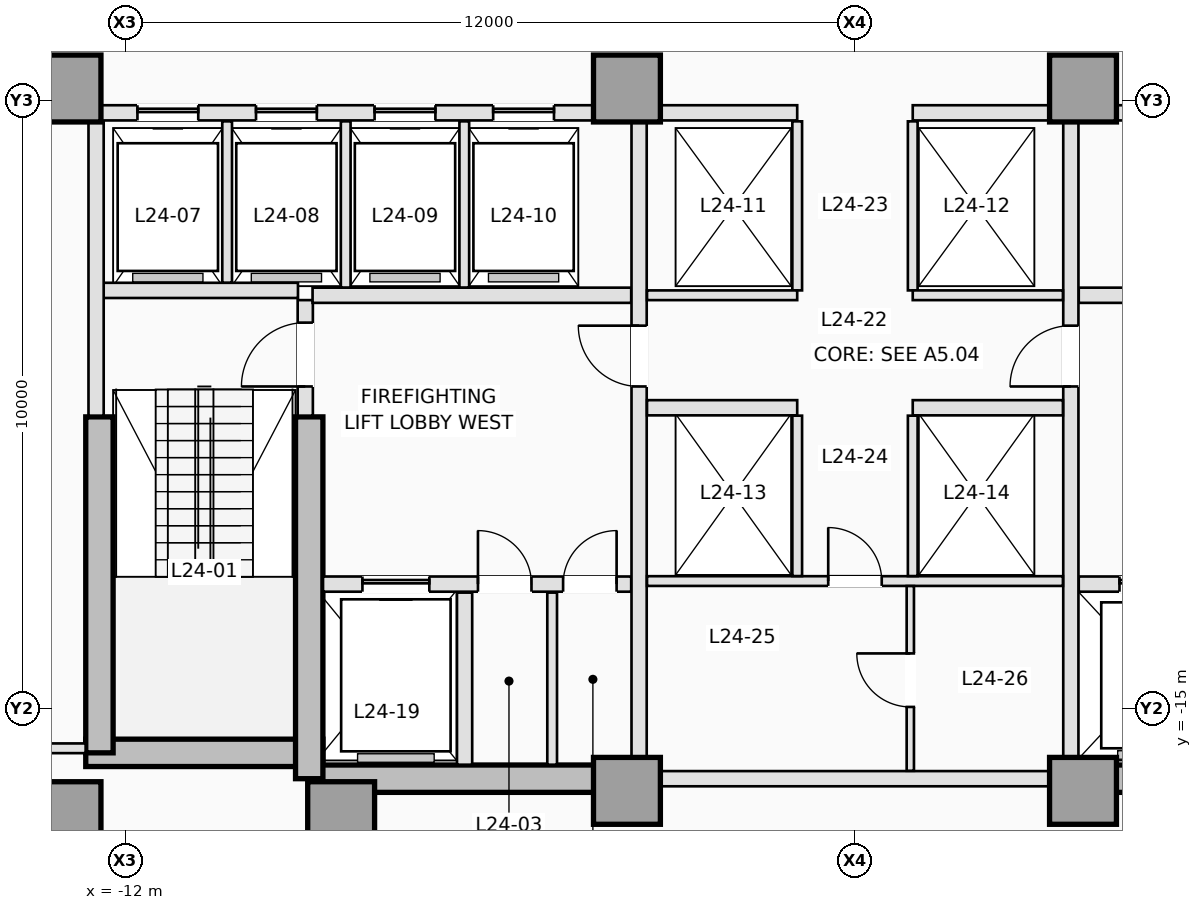
"""IFC4 building model, lengths in metres.
Left out: names, types, materials, properties, quantities, classifications, styles, units other than length and angle.
Written with IfcOpenShell. Run it as: python <this file> out.ifc"""

import sys

from ifc_helpers import new_model, si_unit, direction, frame, frame_2d, origin, origin_2d, place, context, subcontext, project, spatial, rectangle, extrude, element, fill, save


model = new_model("IFC4")
c1 = context("Model", 3, precision=1e-05, world=origin(), true_north=direction((0.0, 1.0)))
c2 = subcontext(c1, "Body", "Model", "MODEL_VIEW")
j1 = project(units=[si_unit("LENGTHUNIT", "METRE"), si_unit("PLANEANGLEUNIT", "RADIAN")], contexts=[c1])
p1 = place(None, origin())
s1 = spatial("IfcSite", under=j1, at=p1, CompositionType="ELEMENT")
p2 = place(p1, origin())
s2 = spatial("IfcBuilding", under=s1, at=p2, CompositionType="ELEMENT")
p3 = place(p2, frame((0.0, 0.0, 90.6)))
s3 = spatial("IfcBuildingStorey", under=s2, at=p3, CompositionType="ELEMENT", Elevation=90.6)
p4 = place(p3, frame((-12.65, -15.725, 0.0), z_axis=(0.0, 0.0, 1.0), x_axis=(1.0, 0.0, 0.0)))
e1 = element("IfcWall", 1, at=p4, inside=s3, PredefinedType="SHEAR", context=c2, shape_type="SweptSolid", body=[
    extrude(rectangle(XDim=3.9, YDim=0.45, at=frame_2d((1.95, 0.0))), origin(), (0.0, 0.0, 1.0), 4.4),
])
for number, where, z_axis, x_axis in (
    (2, (-8.975, -16.15, 0.0), (0.0, 0.0, 1.0), (1.0, 0.0, 0.0)),
    (3, (3.75, -16.15, 0.0), (0.0, 0.0, 1.0), (1.0, 0.0, 0.0)),
):
    element("IfcWall", number, at=place(p3, frame(where, z_axis=z_axis, x_axis=x_axis)), inside=s3, PredefinedType="SHEAR", context=c2, shape_type="SweptSolid", body=[
        extrude(rectangle(XDim=5.225, YDim=0.45, at=frame_2d((2.613, 0.0))), origin(), (0.0, 0.0, 1.0), 4.4),
    ])
p5 = place(p3, frame((-12.425, -15.725, 0.0), z_axis=(0.0, 0.0, 1.0), x_axis=(0.0, 1.0, 0.0)))
e4 = element("IfcWall", 4, at=p5, inside=s3, PredefinedType="SHEAR", context=c2, shape_type="SweptSolid", body=[
    extrude(rectangle(XDim=5.525, YDim=0.45, at=frame_2d((2.763, 0.0))), origin(), (0.0, 0.0, 1.0), 4.4),
])
p6 = place(p3, frame((-8.975, -16.15, 0.0), z_axis=(0.0, 0.0, 1.0), x_axis=(0.0, 1.0, 0.0)))
e5 = element("IfcWall", 5, at=p6, inside=s3, PredefinedType="SHEAR", context=c2, shape_type="SweptSolid", body=[
    extrude(rectangle(XDim=5.95, YDim=0.45, at=frame_2d((2.975, 0.0))), origin(), (0.0, 0.0, 1.0), 4.4),
])
for number, where, z_axis, x_axis in (
    (6, (-12.95, -16.75, 0.0), (0.0, 0.0, 1.0), (1.0, 0.0, 0.0)),
    (7, (-8.45, -16.75, 0.0), (0.0, 0.0, 1.0), (1.0, 0.0, 0.0)),
    (8, (-3.75, -16.35, 0.0), (0.0, 0.0, 1.0), (1.0, 0.0, 0.0)),
    (9, (3.75, -16.35, 0.0), (0.0, 0.0, 1.0), (1.0, 0.0, 0.0)),
    (10, (-12.95, -4.8, 0.0), (0.0, 0.0, 1.0), (1.0, 0.0, 0.0)),
    (11, (-3.75, -4.8, 0.0), (0.0, 0.0, 1.0), (1.0, 0.0, 0.0)),
    (12, (3.75, -4.8, 0.0), (0.0, 0.0, 1.0), (1.0, 0.0, 0.0)),
):
    element("IfcColumn", number, at=place(p3, frame(where, z_axis=z_axis, x_axis=x_axis)), inside=s3, PredefinedType="COLUMN", context=c2, shape_type="SweptSolid", body=[
        extrude(rectangle(XDim=1.1, YDim=1.1, at=origin_2d()), origin(), (0.0, 0.0, 1.0), 4.4),
    ])
p7 = place(p3, frame((-9.04, -10.18, 0.0), z_axis=(0.0, 0.0, 1.0), x_axis=(0.0, 1.0, 0.0)))
e13 = element("IfcWall", 13, at=p7, inside=s3, PredefinedType="PARTITIONING", context=c2, shape_type="SweptSolid", body=[
    extrude(rectangle(XDim=1.9, YDim=0.25, at=frame_2d((0.95, 0.0))), origin(), (0.0, 0.0, 1.0), 4.15),
])
p8 = place(p7, frame((0.48, 0.0, 0.0)))
e14 = element("IfcOpeningElement", 14, at=p8, cuts=e13, PredefinedType="OPENING", context=c2, shape_type="SweptSolid", body=[
    extrude(rectangle(XDim=1.05, YDim=2.15, at=frame_2d((0.525, 1.075))), frame((0.0, 0.135, 0.0), z_axis=(0.0, -1.0, 0.0), x_axis=(1.0, 0.0, 0.0)), (0.0, 0.0, 1.0), 0.27),
])
p9 = place(p3, frame((-12.38, -8.12, 0.0), z_axis=(0.0, 0.0, 1.0), x_axis=(1.0, 0.0, 0.0)))
e15 = element("IfcWall", 15, at=p9, inside=s3, PredefinedType="PARTITIONING", context=c2, shape_type="SweptSolid", body=[
    extrude(rectangle(XDim=3.22, YDim=0.25, at=frame_2d((1.61, 0.0))), origin(), (0.0, 0.0, 1.0), 4.15),
])
p10 = place(p3, frame((-12.48, -10.18, 0.0), z_axis=(0.0, 0.0, 1.0), x_axis=(0.0, 1.0, 0.0)))
e16 = element("IfcWall", 16, at=p10, inside=s3, PredefinedType="PARTITIONING", context=c2, shape_type="SweptSolid", body=[
    extrude(rectangle(XDim=4.828, YDim=0.25, at=frame_2d((2.414, 0.0))), origin(), (0.0, 0.0, 1.0), 4.15),
])
p11 = place(p3, frame((-8.748, -12.95, 0.0), z_axis=(0.0, 0.0, 1.0), x_axis=(1.0, 0.0, 0.0)))
e17 = element("IfcWall", 17, at=p11, inside=s3, PredefinedType="PARTITIONING", context=c2, shape_type="SweptSolid", body=[
    extrude(rectangle(XDim=5.068, YDim=0.25, at=frame_2d((2.534, 0.0))), origin(), (0.0, 0.0, 1.0), 4.15),
])
p12 = place(p11, frame((0.648, 0.0, 0.0)))
e18 = element("IfcOpeningElement", 18, at=p12, cuts=e17, PredefinedType="OPENING", context=c2, shape_type="SweptSolid", body=[
    extrude(rectangle(XDim=1.1, YDim=2.15, at=frame_2d((0.55, 1.075))), frame((0.0, 0.135, 0.0), z_axis=(0.0, -1.0, 0.0), x_axis=(1.0, 0.0, 0.0)), (0.0, 0.0, 1.0), 0.27),
])
p13 = place(p11, frame((2.548, 0.0, 0.0)))
e19 = element("IfcOpeningElement", 19, at=p13, cuts=e17, PredefinedType="OPENING", context=c2, shape_type="SweptSolid", body=[
    extrude(rectangle(XDim=0.88, YDim=2.1, at=frame_2d((0.44, 1.05))), frame((0.0, 0.135, 0.0), z_axis=(0.0, -1.0, 0.0), x_axis=(1.0, 0.0, 0.0)), (0.0, 0.0, 1.0), 0.27),
])
p14 = place(p11, frame((3.948, 0.0, 0.0)))
e20 = element("IfcOpeningElement", 20, at=p14, cuts=e17, PredefinedType="OPENING", context=c2, shape_type="SweptSolid", body=[
    extrude(rectangle(XDim=0.88, YDim=2.1, at=frame_2d((0.44, 1.05))), frame((0.0, 0.135, 0.0), z_axis=(0.0, -1.0, 0.0), x_axis=(1.0, 0.0, 0.0)), (0.0, 0.0, 1.0), 0.27),
])
p15 = place(p3, frame((3.68, -12.95, 0.0), z_axis=(0.0, 0.0, 1.0), x_axis=(1.0, 0.0, 0.0)))
e21 = element("IfcWall", 21, at=p15, inside=s3, PredefinedType="PARTITIONING", context=c2, shape_type="SweptSolid", body=[
    extrude(rectangle(XDim=5.068, YDim=0.25, at=frame_2d((2.534, 0.0))), origin(), (0.0, 0.0, 1.0), 4.15),
])
p16 = place(p15, frame((3.32, 0.0, 0.0)))
e22 = element("IfcOpeningElement", 22, at=p16, cuts=e21, PredefinedType="OPENING", context=c2, shape_type="SweptSolid", body=[
    extrude(rectangle(XDim=1.1, YDim=2.15, at=frame_2d((0.55, 1.075))), frame((0.0, 0.135, 0.0), z_axis=(0.0, -1.0, 0.0), x_axis=(1.0, 0.0, 0.0)), (0.0, 0.0, 1.0), 0.27),
])
p17 = place(p15, frame((0.67, 0.0, 0.0)))
e23 = element("IfcOpeningElement", 23, at=p17, cuts=e21, PredefinedType="OPENING", context=c2, shape_type="SweptSolid", body=[
    extrude(rectangle(XDim=1.2, YDim=2.15, at=frame_2d((0.6, 1.075))), frame((0.0, 0.135, 0.0), z_axis=(0.0, -1.0, 0.0), x_axis=(1.0, 0.0, 0.0)), (0.0, 0.0, 1.0), 0.27),
])
p18 = place(p3, frame((-6.42, -15.92, 0.0), z_axis=(0.0, 0.0, 1.0), x_axis=(0.0, 1.0, 0.0)))
e24 = element("IfcWall", 24, at=p18, inside=s3, PredefinedType="PARTITIONING", context=c2, shape_type="SweptSolid", body=[
    extrude(rectangle(XDim=2.83, YDim=0.25, at=frame_2d((1.415, 0.0))), origin(), (0.0, 0.0, 1.0), 4.15),
])
p19 = place(p3, frame((-4.98, -15.92, 0.0), z_axis=(0.0, 0.0, 1.0), x_axis=(0.0, 1.0, 0.0)))
e25 = element("IfcWall", 25, at=p19, inside=s3, PredefinedType="PARTITIONING", context=c2, shape_type="SweptSolid", body=[
    extrude(rectangle(XDim=2.83, YDim=0.16, at=frame_2d((1.415, 0.0))), origin(), (0.0, 0.0, 1.0), 4.15),
])
for number, where, z_axis, x_axis in (
    (26, (-8.92, -8.2, 0.0), (0.0, 0.0, 1.0), (1.0, 0.0, 0.0)),
    (27, (3.68, -8.2, 0.0), (0.0, 0.0, 1.0), (1.0, 0.0, 0.0)),
):
    element("IfcWall", number, at=place(p3, frame(where, z_axis=z_axis, x_axis=x_axis)), inside=s3, PredefinedType="PARTITIONING", context=c2, shape_type="SweptSolid", body=[
        extrude(rectangle(XDim=5.24, YDim=0.25, at=frame_2d((2.62, 0.0))), origin(), (0.0, 0.0, 1.0), 4.15),
    ])
p20 = place(p3, frame((-3.55, -15.798, 0.0), z_axis=(0.0, 0.0, 1.0), x_axis=(0.0, 1.0, 0.0)))
e28 = element("IfcWall", 28, at=p20, inside=s3, PredefinedType="PARTITIONING", context=c2, shape_type="SweptSolid", body=[
    extrude(rectangle(XDim=10.446, YDim=0.25, at=frame_2d((5.223, 0.0))), origin(), (0.0, 0.0, 1.0), 4.15),
])
p21 = place(p20, frame((6.098, 0.0, 0.0)))
e29 = element("IfcOpeningElement", 29, at=p21, cuts=e28, PredefinedType="OPENING", context=c2, shape_type="SweptSolid", body=[
    extrude(rectangle(XDim=1.0, YDim=2.15, at=frame_2d((0.5, 1.075))), frame((0.0, 0.135, 0.0), z_axis=(0.0, -1.0, 0.0), x_axis=(1.0, 0.0, 0.0)), (0.0, 0.0, 1.0), 0.27),
])
p22 = place(p3, frame((3.55, -15.798, 0.0), z_axis=(0.0, 0.0, 1.0), x_axis=(0.0, 1.0, 0.0)))
e30 = element("IfcWall", 30, at=p22, inside=s3, PredefinedType="PARTITIONING", context=c2, shape_type="SweptSolid", body=[
    extrude(rectangle(XDim=10.446, YDim=0.25, at=frame_2d((5.223, 0.0))), origin(), (0.0, 0.0, 1.0), 4.15),
])
p23 = place(p22, frame((6.098, 0.0, 0.0)))
e31 = element("IfcOpeningElement", 31, at=p23, cuts=e30, PredefinedType="OPENING", context=c2, shape_type="SweptSolid", body=[
    extrude(rectangle(XDim=1.0, YDim=2.15, at=frame_2d((0.5, 1.075))), frame((0.0, 0.135, 0.0), z_axis=(0.0, -1.0, 0.0), x_axis=(1.0, 0.0, 0.0)), (0.0, 0.0, 1.0), 0.27),
])
p24 = place(p3, frame((-12.398, -5.2, 0.0), z_axis=(0.0, 0.0, 1.0), x_axis=(1.0, 0.0, 0.0)))
e32 = element("IfcWall", 32, at=p24, inside=s3, PredefinedType="PARTITIONING", context=c2, shape_type="SweptSolid", body=[
    extrude(rectangle(XDim=8.096, YDim=0.25, at=frame_2d((4.048, 0.0))), origin(), (0.0, 0.0, 1.0), 4.15),
])
p25 = place(p24, frame((0.598, 0.0, 0.0)))
e33 = element("IfcOpeningElement", 33, at=p25, cuts=e32, PredefinedType="OPENING", context=c2, shape_type="SweptSolid", body=[
    extrude(rectangle(XDim=1.0, YDim=2.15, at=frame_2d((0.5, 1.075))), frame((0.0, 0.135, 0.0), z_axis=(0.0, -1.0, 0.0), x_axis=(1.0, 0.0, 0.0)), (0.0, 0.0, 1.0), 0.27),
])
p26 = place(p24, frame((2.548, 0.0, 0.0)))
e34 = element("IfcOpeningElement", 34, at=p26, cuts=e32, PredefinedType="OPENING", context=c2, shape_type="SweptSolid", body=[
    extrude(rectangle(XDim=1.0, YDim=2.15, at=frame_2d((0.5, 1.075))), frame((0.0, 0.135, 0.0), z_axis=(0.0, -1.0, 0.0), x_axis=(1.0, 0.0, 0.0)), (0.0, 0.0, 1.0), 0.27),
])
p27 = place(p24, frame((4.498, 0.0, 0.0)))
e35 = element("IfcOpeningElement", 35, at=p27, cuts=e32, PredefinedType="OPENING", context=c2, shape_type="SweptSolid", body=[
    extrude(rectangle(XDim=1.0, YDim=2.15, at=frame_2d((0.5, 1.075))), frame((0.0, 0.135, 0.0), z_axis=(0.0, -1.0, 0.0), x_axis=(1.0, 0.0, 0.0)), (0.0, 0.0, 1.0), 0.27),
])
p28 = place(p24, frame((6.448, 0.0, 0.0)))
e36 = element("IfcOpeningElement", 36, at=p28, cuts=e32, PredefinedType="OPENING", context=c2, shape_type="SweptSolid", body=[
    extrude(rectangle(XDim=1.0, YDim=2.15, at=frame_2d((0.5, 1.075))), frame((0.0, 0.135, 0.0), z_axis=(0.0, -1.0, 0.0), x_axis=(1.0, 0.0, 0.0)), (0.0, 0.0, 1.0), 0.27),
])
p29 = place(p3, frame((4.302, -5.2, 0.0), z_axis=(0.0, 0.0, 1.0), x_axis=(1.0, 0.0, 0.0)))
e37 = element("IfcWall", 37, at=p29, inside=s3, PredefinedType="PARTITIONING", context=c2, shape_type="SweptSolid", body=[
    extrude(rectangle(XDim=8.096, YDim=0.25, at=frame_2d((4.048, 0.0))), origin(), (0.0, 0.0, 1.0), 4.15),
])
for number, where, z_axis, x_axis in (
    (38, (-3.198, -5.2, 0.0), (0.0, 0.0, 1.0), (1.0, 0.0, 0.0)),
    (39, (0.95, -5.2, 0.0), (0.0, 0.0, 1.0), (1.0, 0.0, 0.0)),
):
    element("IfcWall", number, at=place(p3, frame(where, z_axis=z_axis, x_axis=x_axis)), inside=s3, PredefinedType="PARTITIONING", context=c2, shape_type="SweptSolid", body=[
        extrude(rectangle(XDim=2.248, YDim=0.25, at=frame_2d((1.124, 0.0))), origin(), (0.0, 0.0, 1.0), 4.15),
    ])
p30 = place(p3, frame((-10.325, -7.993, 0.0), z_axis=(0.0, 0.0, 1.0), x_axis=(0.0, 1.0, 0.0)))
e40 = element("IfcWall", 40, at=p30, inside=s3, PredefinedType="PARTITIONING", context=c2, shape_type="SweptSolid", body=[
    extrude(rectangle(XDim=2.653, YDim=0.16, at=frame_2d((1.326, 0.0))), origin(), (0.0, 0.0, 1.0), 4.15),
])
for number, where, z_axis, x_axis in (
    (41, (-8.375, -8.073, 0.0), (0.0, 0.0, 1.0), (0.0, 1.0, 0.0)),
    (42, (-6.425, -8.073, 0.0), (0.0, 0.0, 1.0), (0.0, 1.0, 0.0)),
):
    element("IfcWall", number, at=place(p3, frame(where, z_axis=z_axis, x_axis=x_axis)), inside=s3, PredefinedType="PARTITIONING", context=c2, shape_type="SweptSolid", body=[
        extrude(rectangle(XDim=2.733, YDim=0.16, at=frame_2d((1.366, 0.0))), origin(), (0.0, 0.0, 1.0), 4.15),
    ])
p31 = place(p3, frame((-3.198, -16.15, 0.0), z_axis=(0.0, 0.0, 1.0), x_axis=(1.0, 0.0, 0.0)))
e43 = element("IfcWall", 43, at=p31, inside=s3, PredefinedType="PARTITIONING", context=c2, shape_type="SweptSolid", body=[
    extrude(rectangle(XDim=6.396, YDim=0.25, at=frame_2d((3.198, 0.0))), origin(), (0.0, 0.0, 1.0), 3.2),
])
for number, where, z_axis, x_axis in (
    (44, (-0.95, -8.12, 0.0), (0.0, 0.0, 1.0), (0.0, 1.0, 0.0)),
    (45, (0.95, -8.12, 0.0), (0.0, 0.0, 1.0), (0.0, 1.0, 0.0)),
):
    element("IfcWall", number, at=place(p3, frame(where, z_axis=z_axis, x_axis=x_axis)), inside=s3, PredefinedType="PARTITIONING", context=c2, shape_type="SweptSolid", body=[
        extrude(rectangle(XDim=2.78, YDim=0.16, at=frame_2d((1.39, 0.0))), origin(), (0.0, 0.0, 1.0), 4.15),
    ])
for number, where, z_axis, x_axis in (
    (46, (-3.42, -8.2, 0.0), (0.0, 0.0, 1.0), (1.0, 0.0, 0.0)),
    (47, (0.95, -8.2, 0.0), (0.0, 0.0, 1.0), (1.0, 0.0, 0.0)),
):
    element("IfcWall", number, at=place(p3, frame(where, z_axis=z_axis, x_axis=x_axis)), inside=s3, PredefinedType="PARTITIONING", context=c2, shape_type="SweptSolid", body=[
        extrude(rectangle(XDim=2.47, YDim=0.16, at=frame_2d((1.235, 0.0))), origin(), (0.0, 0.0, 1.0), 4.15),
    ])
for number, where, z_axis, x_axis in (
    (48, (-3.42, -10.05, 0.0), (0.0, 0.0, 1.0), (1.0, 0.0, 0.0)),
    (49, (0.95, -10.05, 0.0), (0.0, 0.0, 1.0), (1.0, 0.0, 0.0)),
):
    element("IfcWall", number, at=place(p3, frame(where, z_axis=z_axis, x_axis=x_axis)), inside=s3, PredefinedType="PARTITIONING", context=c2, shape_type="SweptSolid", body=[
        extrude(rectangle(XDim=2.47, YDim=0.25, at=frame_2d((1.235, 0.0))), origin(), (0.0, 0.0, 1.0), 4.15),
    ])
p32 = place(p3, frame((-3.42, -12.9, 0.0), z_axis=(0.0, 0.0, 1.0), x_axis=(1.0, 0.0, 0.0)))
e50 = element("IfcWall", 50, at=p32, inside=s3, PredefinedType="PARTITIONING", context=c2, shape_type="SweptSolid", body=[
    extrude(rectangle(XDim=6.84, YDim=0.16, at=frame_2d((3.42, 0.0))), origin(), (0.0, 0.0, 1.0), 4.15),
])
p33 = place(p32, frame((2.98, 0.0, 0.0)))
e51 = element("IfcOpeningElement", 51, at=p33, cuts=e50, PredefinedType="OPENING", context=c2, shape_type="SweptSolid", body=[
    extrude(rectangle(XDim=0.88, YDim=2.12, at=frame_2d((0.44, 1.06))), frame((0.0, 0.09, 0.0), z_axis=(0.0, -1.0, 0.0), x_axis=(1.0, 0.0, 0.0)), (0.0, 0.0, 1.0), 0.18),
])
for number, where, z_axis, x_axis in (
    (52, (-0.95, -12.818, 0.0), (0.0, 0.0, 1.0), (0.0, 1.0, 0.0)),
    (53, (0.95, -12.818, 0.0), (0.0, 0.0, 1.0), (0.0, 1.0, 0.0)),
):
    element("IfcWall", number, at=place(p3, frame(where, z_axis=z_axis, x_axis=x_axis)), inside=s3, PredefinedType="PARTITIONING", context=c2, shape_type="SweptSolid", body=[
        extrude(rectangle(XDim=2.638, YDim=0.16, at=frame_2d((1.319, 0.0))), origin(), (0.0, 0.0, 1.0), 4.15),
    ])
p34 = place(p3, frame((0.91, -16.02, 0.0), z_axis=(0.0, 0.0, 1.0), x_axis=(0.0, 1.0, 0.0)))
e54 = element("IfcWall", 54, at=p34, inside=s3, PredefinedType="PARTITIONING", context=c2, shape_type="SweptSolid", body=[
    extrude(rectangle(XDim=3.038, YDim=0.12, at=frame_2d((1.519, 0.0))), origin(), (0.0, 0.0, 1.0), 4.15),
])
p35 = place(p34, frame((1.05, 0.0, 0.0)))
e55 = element("IfcOpeningElement", 55, at=p35, cuts=e54, PredefinedType="OPENING", context=c2, shape_type="SweptSolid", body=[
    extrude(rectangle(XDim=0.88, YDim=2.12, at=frame_2d((0.44, 1.06))), frame((0.0, 0.07, 0.0), z_axis=(0.0, -1.0, 0.0), x_axis=(1.0, 0.0, 0.0)), (0.0, 0.0, 1.0), 0.14),
])
p36 = place(p3, frame((-18.432, -15.65, 0.0), z_axis=(0.0, 0.0, 1.0), x_axis=(1.0, 0.0, 0.0)))
e56 = element("IfcWall", 56, at=p36, inside=s3, PredefinedType="PARTITIONING", context=c2, shape_type="SweptSolid", body=[
    extrude(rectangle(XDim=5.78, YDim=0.16, at=frame_2d((2.89, 0.0))), origin(), (0.0, 0.0, 1.0), 4.15),
])
p37 = place(p25, origin())
e57 = element("IfcDoor", 57, at=p37, inside=s3, OperationType="SLIDING_TO_LEFT", PredefinedType="DOOR", context=c2, shape_type="SweptSolid", body=[
    extrude(rectangle(XDim=1.0, YDim=2.15, at=frame_2d((0.5, 1.075))), frame((0.0, 0.025, 0.0), z_axis=(0.0, -1.0, 0.0), x_axis=(1.0, 0.0, 0.0)), (0.0, 0.0, 1.0), 0.05),
])
fill(e33, e57)
p38 = place(p26, origin())
e58 = element("IfcDoor", 58, at=p38, inside=s3, OperationType="SLIDING_TO_LEFT", PredefinedType="DOOR", context=c2, shape_type="SweptSolid", body=[
    extrude(rectangle(XDim=1.0, YDim=2.15, at=frame_2d((0.5, 1.075))), frame((0.0, 0.025, 0.0), z_axis=(0.0, -1.0, 0.0), x_axis=(1.0, 0.0, 0.0)), (0.0, 0.0, 1.0), 0.05),
])
fill(e34, e58)
p39 = place(p27, origin())
e59 = element("IfcDoor", 59, at=p39, inside=s3, OperationType="SLIDING_TO_LEFT", PredefinedType="DOOR", context=c2, shape_type="SweptSolid", body=[
    extrude(rectangle(XDim=1.0, YDim=2.15, at=frame_2d((0.5, 1.075))), frame((0.0, 0.025, 0.0), z_axis=(0.0, -1.0, 0.0), x_axis=(1.0, 0.0, 0.0)), (0.0, 0.0, 1.0), 0.05),
])
fill(e35, e59)
p40 = place(p28, origin())
e60 = element("IfcDoor", 60, at=p40, inside=s3, OperationType="SLIDING_TO_LEFT", PredefinedType="DOOR", context=c2, shape_type="SweptSolid", body=[
    extrude(rectangle(XDim=1.0, YDim=2.15, at=frame_2d((0.5, 1.075))), frame((0.0, 0.025, 0.0), z_axis=(0.0, -1.0, 0.0), x_axis=(1.0, 0.0, 0.0)), (0.0, 0.0, 1.0), 0.05),
])
fill(e36, e60)
p41 = place(p12, origin())
e61 = element("IfcDoor", 61, at=p41, inside=s3, OperationType="SLIDING_TO_LEFT", PredefinedType="DOOR", context=c2, shape_type="SweptSolid", body=[
    extrude(rectangle(XDim=1.1, YDim=2.15, at=frame_2d((0.55, 1.075))), frame((0.0, 0.025, 0.0), z_axis=(0.0, -1.0, 0.0), x_axis=(1.0, 0.0, 0.0)), (0.0, 0.0, 1.0), 0.05),
])
fill(e18, e61)
p42 = place(p17, origin())
e62 = element("IfcDoor", 62, at=p42, inside=s3, OperationType="SLIDING_TO_LEFT", PredefinedType="DOOR", context=c2, shape_type="SweptSolid", body=[
    extrude(rectangle(XDim=1.2, YDim=2.15, at=frame_2d((0.6, 1.075))), frame((0.0, 0.025, 0.0), z_axis=(0.0, -1.0, 0.0), x_axis=(1.0, 0.0, 0.0)), (0.0, 0.0, 1.0), 0.05),
])
fill(e23, e62)
p43 = place(p8, origin())
e63 = element("IfcDoor", 63, at=p43, inside=s3, OperationType="SINGLE_SWING_LEFT", PredefinedType="DOOR", context=c2, shape_type="SweptSolid", body=[
    extrude(rectangle(XDim=1.05, YDim=2.15, at=frame_2d((0.525, 1.075))), frame((0.0, 0.025, 0.0), z_axis=(0.0, -1.0, 0.0), x_axis=(1.0, 0.0, 0.0)), (0.0, 0.0, 1.0), 0.05),
])
fill(e14, e63)
p44 = place(p13, origin())
e64 = element("IfcDoor", 64, at=p44, inside=s3, OperationType="SINGLE_SWING_LEFT", PredefinedType="TRAPDOOR", context=c2, shape_type="SweptSolid", body=[
    extrude(rectangle(XDim=0.88, YDim=2.1, at=frame_2d((0.44, 1.05))), frame((0.0, 0.025, 0.0), z_axis=(0.0, -1.0, 0.0), x_axis=(1.0, 0.0, 0.0)), (0.0, 0.0, 1.0), 0.05),
])
fill(e19, e64)
p45 = place(p14, origin())
e65 = element("IfcDoor", 65, at=p45, inside=s3, OperationType="SINGLE_SWING_RIGHT", PredefinedType="TRAPDOOR", context=c2, shape_type="SweptSolid", body=[
    extrude(rectangle(XDim=0.88, YDim=2.1, at=frame_2d((0.44, 1.05))), frame((0.0, 0.025, 0.0), z_axis=(0.0, -1.0, 0.0), x_axis=(1.0, 0.0, 0.0)), (0.0, 0.0, 1.0), 0.05),
])
fill(e20, e65)
p46 = place(p21, origin())
e66 = element("IfcDoor", 66, at=p46, inside=s3, OperationType="SINGLE_SWING_RIGHT", PredefinedType="DOOR", context=c2, shape_type="SweptSolid", body=[
    extrude(rectangle(XDim=1.0, YDim=2.15, at=frame_2d((0.5, 1.075))), frame((0.0, 0.025, 0.0), z_axis=(0.0, -1.0, 0.0), x_axis=(1.0, 0.0, 0.0)), (0.0, 0.0, 1.0), 0.05),
])
fill(e29, e66)
p47 = place(p23, origin())
e67 = element("IfcDoor", 67, at=p47, inside=s3, OperationType="SINGLE_SWING_LEFT", PredefinedType="DOOR", context=c2, shape_type="SweptSolid", body=[
    extrude(rectangle(XDim=1.0, YDim=2.15, at=frame_2d((0.5, 1.075))), frame((0.0, 0.025, 0.0), z_axis=(0.0, -1.0, 0.0), x_axis=(1.0, 0.0, 0.0)), (0.0, 0.0, 1.0), 0.05),
])
fill(e31, e67)
p48 = place(p33, origin())
e68 = element("IfcDoor", 68, at=p48, inside=s3, OperationType="SINGLE_SWING_LEFT", PredefinedType="DOOR", context=c2, shape_type="SweptSolid", body=[
    extrude(rectangle(XDim=0.88, YDim=2.12, at=frame_2d((0.44, 1.06))), frame((0.0, 0.025, 0.0), z_axis=(0.0, -1.0, 0.0), x_axis=(1.0, 0.0, 0.0)), (0.0, 0.0, 1.0), 0.05),
])
fill(e51, e68)
p49 = place(p35, origin())
e69 = element("IfcDoor", 69, at=p49, inside=s3, OperationType="SINGLE_SWING_RIGHT", PredefinedType="DOOR", context=c2, shape_type="SweptSolid", body=[
    extrude(rectangle(XDim=0.88, YDim=2.12, at=frame_2d((0.44, 1.06))), frame((0.0, 0.025, 0.0), z_axis=(0.0, -1.0, 0.0), x_axis=(1.0, 0.0, 0.0)), (0.0, 0.0, 1.0), 0.05),
])
fill(e55, e69)
save(model, sys.argv[1])
